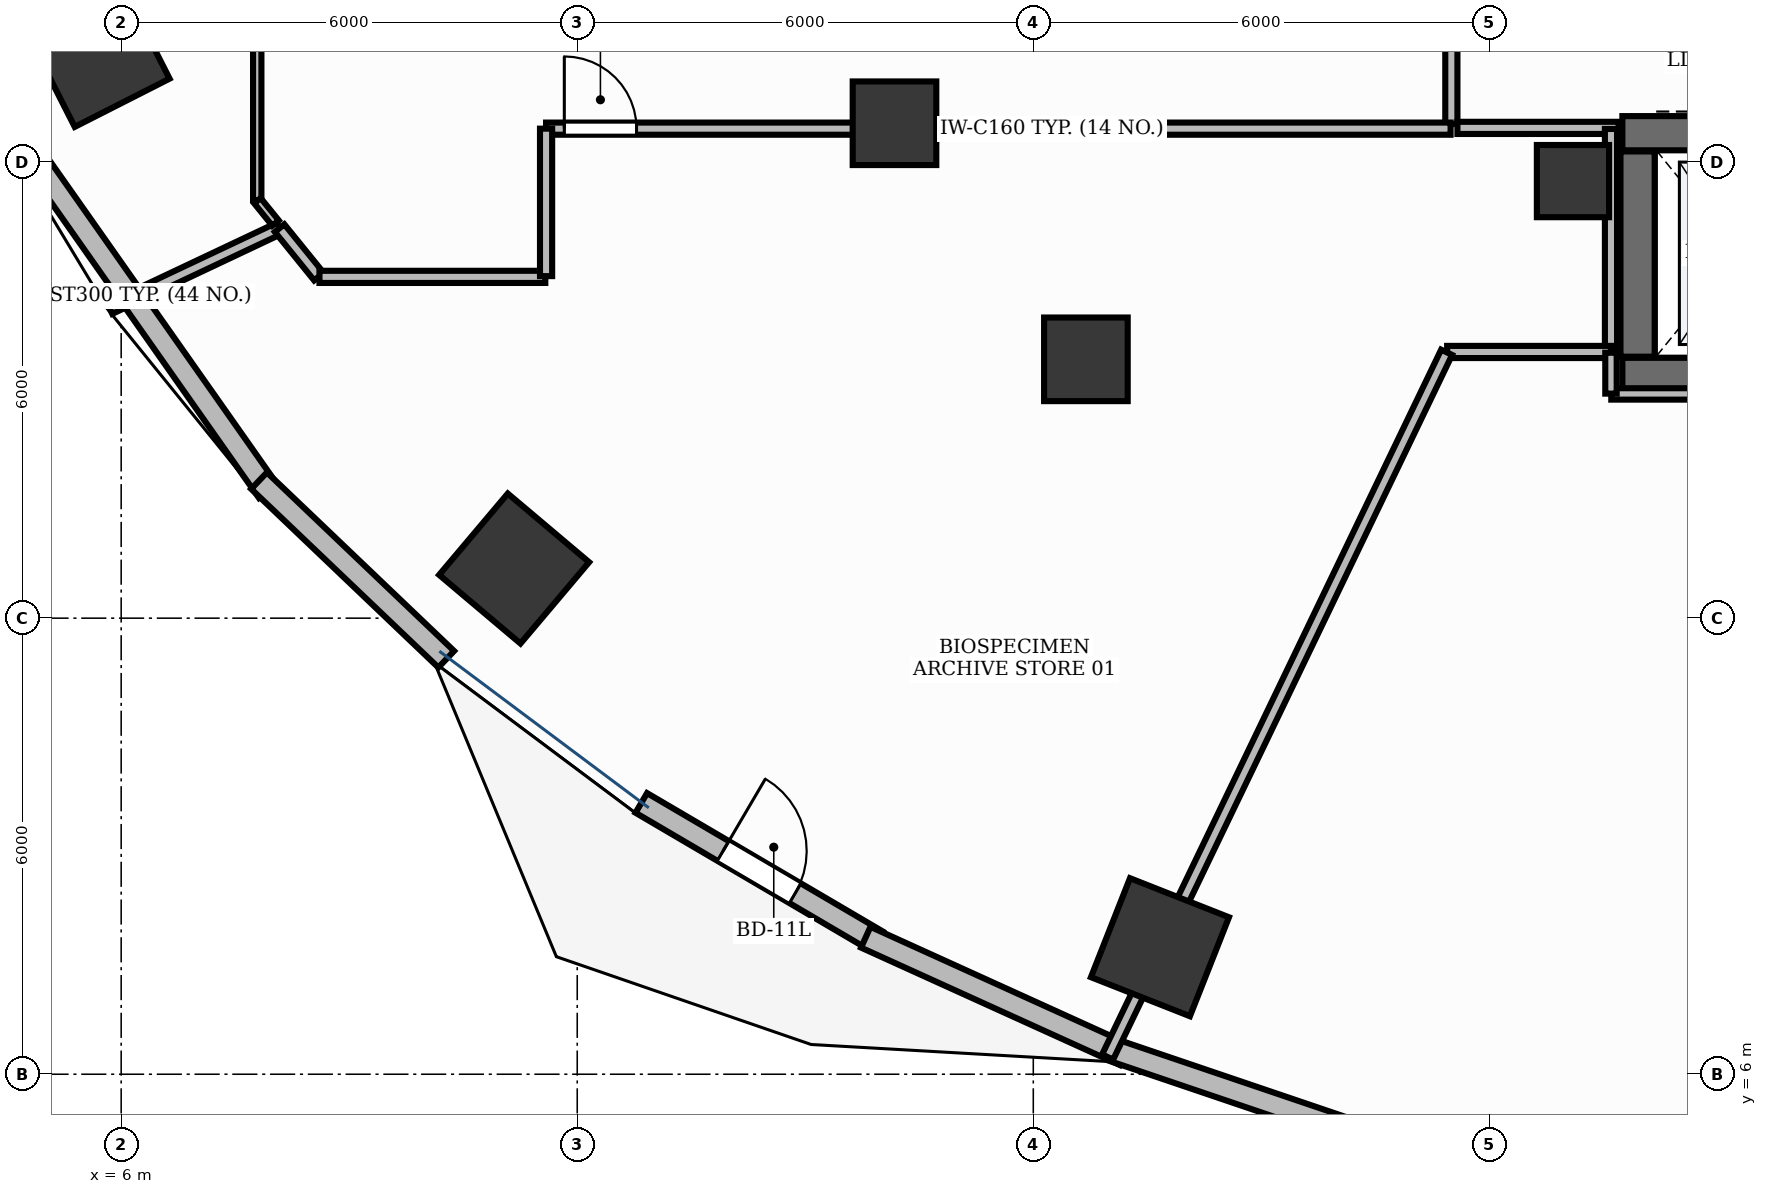
"""IFC4 building model, lengths in metres.
Left out: names, types, materials, properties, quantities, classifications, styles, units other than length and angle.
Written with IfcOpenShell. Run it as: python <this file> out.ifc"""

import sys

from ifc_helpers import new_model, si_unit, direction, frame, frame_2d, origin, origin_2d, place, context, subcontext, project, spatial, rectangle, extrude, element, fill, save


model = new_model("IFC4")
c1 = context("Model", 3, precision=1e-05, world=origin(), true_north=direction((0.0, 1.0)))
c2 = subcontext(c1, "Body", "Model", "MODEL_VIEW")
j1 = project(units=[si_unit("LENGTHUNIT", "METRE"), si_unit("PLANEANGLEUNIT", "RADIAN")], contexts=[c1])
p1 = place(None, origin())
s1 = spatial("IfcSite", under=j1, at=p1, CompositionType="ELEMENT")
p2 = place(p1, origin())
s2 = spatial("IfcBuilding", under=s1, at=p2, CompositionType="ELEMENT")
p3 = place(p2, frame((0.0, 0.0, 67.8)))
s3 = spatial("IfcBuildingStorey", under=s2, at=p3, CompositionType="ELEMENT", Elevation=67.8)
p4 = place(p3, frame((25.75, 15.2, 0.0), z_axis=(0.0, 0.0, 1.0), x_axis=(1.0, 0.0, 0.0)))
e1 = element("IfcWall", 1, at=p4, inside=s3, PredefinedType="SHEAR", context=c2, shape_type="SweptSolid", body=[
    extrude(rectangle(XDim=3.1, YDim=0.45, at=frame_2d((1.55, 0.0))), origin(), (0.0, 0.0, 1.0), 3.9),
])
p5 = place(p3, frame((25.75, 18.38, 0.0), z_axis=(0.0, 0.0, 1.0), x_axis=(1.0, 0.0, 0.0)))
e2 = element("IfcWall", 2, at=p5, inside=s3, PredefinedType="SHEAR", context=c2, shape_type="SweptSolid", body=[
    extrude(rectangle(XDim=3.1, YDim=0.45, at=frame_2d((1.55, 0.0))), origin(), (0.0, 0.0, 1.0), 3.9),
])
p6 = place(p5, frame((0.9, 0.0, 0.0)))
e3 = element("IfcOpeningElement", 3, at=p6, cuts=e2, PredefinedType="OPENING", context=c2, shape_type="SweptSolid", body=[
    extrude(rectangle(XDim=1.3, YDim=2.2, at=frame_2d((0.65, 1.1))), frame((0.0, 0.24, 0.0), z_axis=(0.0, -1.0, 0.0), x_axis=(1.0, 0.0, 0.0)), (0.0, 0.0, 1.0), 0.48),
])
p7 = place(p3, frame((25.95, 15.44, 0.0), z_axis=(0.0, 0.0, 1.0), x_axis=(0.0, 1.0, 0.0)))
e4 = element("IfcWall", 4, at=p7, inside=s3, PredefinedType="SHEAR", context=c2, shape_type="SweptSolid", body=[
    extrude(rectangle(XDim=2.7, YDim=0.45, at=frame_2d((1.35, 0.0))), origin(), (0.0, 0.0, 1.0), 3.9),
])
p8 = place(p3, frame((25.1, 17.75, -0.0), z_axis=(0.0, 0.0, 1.0), x_axis=(1.0, 0.0, 0.0)))
e5 = element("IfcColumn", 5, at=p8, inside=s3, PredefinedType="PILASTER", context=c2, shape_type="SweptSolid", body=[
    extrude(rectangle(XDim=0.95, YDim=0.95, at=origin_2d()), origin(), (0.0, 0.0, 1.0), 3.901),
])
p9 = place(p3, frame((5.696, 19.404, -0.0), z_axis=(0.0, 0.0, 1.0), x_axis=(-0.453057191132, 0.891481453292, 0.0)))
e6 = element("IfcColumn", 6, at=p9, inside=s3, PredefinedType="COLUMN", context=c2, shape_type="SweptSolid", body=[
    extrude(rectangle(XDim=1.4, YDim=1.4, at=origin_2d()), origin(), (0.0, 0.0, 1.0), 3.901),
])
p10 = place(p3, frame((16.174, 18.511, -0.0), z_axis=(0.0, 0.0, 1.0), x_axis=(1.0, 0.0, 0.0)))
e7 = element("IfcColumn", 7, at=p10, inside=s3, PredefinedType="COLUMN", context=c2, shape_type="SweptSolid", body=[
    extrude(rectangle(XDim=1.1, YDim=1.1, at=origin_2d()), origin(), (0.0, 0.0, 1.0), 3.901),
])
p11 = place(p3, frame((11.17, 12.653, -0.0), z_axis=(0.0, 0.0, 1.0), x_axis=(-0.764246456939, 0.644924300253, 0.0)))
e8 = element("IfcColumn", 8, at=p11, inside=s3, PredefinedType="COLUMN", context=c2, shape_type="SweptSolid", body=[
    extrude(rectangle(XDim=1.4, YDim=1.4, at=origin_2d()), origin(), (0.0, 0.0, 1.0), 3.901),
])
p12 = place(p3, frame((18.692, 15.405, -0.0), z_axis=(0.0, 0.0, 1.0), x_axis=(1.0, 0.0, 0.0)))
e9 = element("IfcColumn", 9, at=p12, inside=s3, PredefinedType="COLUMN", context=c2, shape_type="SweptSolid", body=[
    extrude(rectangle(XDim=1.1, YDim=1.1, at=origin_2d()), origin(), (0.0, 0.0, 1.0), 3.901),
])
p13 = place(p3, frame((19.667, 7.671, -0.0), z_axis=(0.0, 0.0, 1.0), x_axis=(-0.930225540858, 0.366988341962, 0.0)))
e10 = element("IfcColumn", 10, at=p13, inside=s3, PredefinedType="COLUMN", context=c2, shape_type="SweptSolid", body=[
    extrude(rectangle(XDim=1.4, YDim=1.4, at=origin_2d()), origin(), (0.0, 0.0, 1.0), 3.901),
])
p14 = place(p3, frame((12.843, 9.569, 0.0), z_axis=(0.0, 0.0, 1.0), x_axis=(0.862473134325, -0.506102847817, 0.0)))
e11 = element("IfcWall", 11, at=p14, inside=s3, PredefinedType="STANDARD", context=c2, shape_type="SweptSolid", body=[
    extrude(rectangle(XDim=3.595, YDim=0.3, at=frame_2d((1.798, 0.0))), origin(), (0.0, 0.0, 1.0), 3.9),
])
p15 = place(p14, frame((1.248, 0.0, 0.0)))
e12 = element("IfcOpeningElement", 12, at=p15, cuts=e11, PredefinedType="OPENING", context=c2, shape_type="SweptSolid", body=[
    extrude(rectangle(XDim=1.1, YDim=2.15, at=frame_2d((0.55, 1.075))), frame((0.0, 0.165, 0.0), z_axis=(0.0, -1.0, 0.0), x_axis=(1.0, 0.0, 0.0)), (0.0, 0.0, 1.0), 0.33),
])
p16 = place(p3, frame((4.315, 18.817, 0.0), z_axis=(0.0, 0.0, 1.0), x_axis=(0.575165804445, -0.818036855769, 0.0)))
e13 = element("IfcWall", 13, at=p16, inside=s3, PredefinedType="STANDARD", context=c2, shape_type="SweptSolid", body=[
    extrude(rectangle(XDim=6.296, YDim=0.3, at=frame_2d((3.148, 0.0))), origin(), (0.0, 0.0, 1.0), 3.9),
])
p17 = place(p3, frame((7.814, 13.808, 0.0), z_axis=(0.0, 0.0, 1.0), x_axis=(0.72369587847, -0.69011902994, 0.0)))
e14 = element("IfcWall", 14, at=p17, inside=s3, PredefinedType="STANDARD", context=c2, shape_type="SweptSolid", body=[
    extrude(rectangle(XDim=3.403, YDim=0.3, at=frame_2d((1.701, 0.0))), origin(), (0.0, 0.0, 1.0), 3.9),
])
p18 = place(p3, frame((15.796, 7.802, 0.0), z_axis=(0.0, 0.0, 1.0), x_axis=(0.910623406862, -0.413237233166, 0.0)))
e15 = element("IfcWall", 15, at=p18, inside=s3, PredefinedType="STANDARD", context=c2, shape_type="SweptSolid", body=[
    extrude(rectangle(XDim=3.74, YDim=0.3, at=frame_2d((1.87, 0.0))), origin(), (0.0, 0.0, 1.0), 3.9),
])
p19 = place(p3, frame((19.04, 6.321, 0.0), z_axis=(0.0, 0.0, 1.0), x_axis=(0.94702579403, -0.321157508773, 0.0)))
e16 = element("IfcWall", 16, at=p19, inside=s3, PredefinedType="STANDARD", context=c2, shape_type="SweptSolid", body=[
    extrude(rectangle(XDim=3.83, YDim=0.3, at=frame_2d((1.915, 0.0))), origin(), (0.0, 0.0, 1.0), 3.47),
])
p20 = place(p3, frame((23.5, 18.5, 0.0), z_axis=(0.0, 0.0, 1.0), x_axis=(0.0, 1.0, 0.0)))
e17 = element("IfcWall", 17, at=p20, inside=s3, PredefinedType="PARTITIONING", context=c2, shape_type="SweptSolid", body=[
    extrude(rectangle(XDim=3.4, YDim=0.16, at=frame_2d((1.7, 0.0))), origin(), (0.0, 0.0, 1.0), 2.91),
])
p21 = place(p20, frame((1.175, 0.0, 0.0)))
e18 = element("IfcOpeningElement", 18, at=p21, cuts=e17, PredefinedType="OPENING", context=c2, shape_type="SweptSolid", body=[
    extrude(rectangle(XDim=1.05, YDim=2.15, at=frame_2d((0.525, 1.075))), frame((0.0, 0.095, 0.0), z_axis=(0.0, -1.0, 0.0), x_axis=(1.0, 0.0, 0.0)), (0.0, 0.0, 1.0), 0.19),
])
p22 = place(p3, frame((23.58, 18.45, 0.0), z_axis=(0.0, 0.0, 1.0), x_axis=(1.0, 0.0, 0.0)))
e19 = element("IfcWall", 19, at=p22, inside=s3, PredefinedType="PARTITIONING", context=c2, shape_type="SweptSolid", body=[
    extrude(rectangle(XDim=2.12, YDim=0.16, at=frame_2d((1.06, 0.0))), origin(), (0.0, 0.0, 1.0), 2.91),
])
p23 = place(p3, frame((11.59, 18.44, 0.0), z_axis=(0.0, 0.0, 1.0), x_axis=(1.0, 0.0, 0.0)))
e20 = element("IfcWall", 20, at=p23, inside=s3, PredefinedType="PARTITIONING", context=c2, shape_type="SweptSolid", body=[
    extrude(rectangle(XDim=11.9, YDim=0.16, at=frame_2d((5.95, 0.0))), origin(), (0.0, 0.0, 1.0), 2.91),
])
p24 = place(p23, frame((0.24, 0.0, 0.0)))
e21 = element("IfcOpeningElement", 21, at=p24, cuts=e20, PredefinedType="OPENING", context=c2, shape_type="SweptSolid", body=[
    extrude(rectangle(XDim=0.95, YDim=2.15, at=frame_2d((0.475, 1.075))), frame((0.0, 0.095, 0.0), z_axis=(0.0, -1.0, 0.0), x_axis=(1.0, 0.0, 0.0)), (0.0, 0.0, 1.0), 0.19),
])
p25 = place(p3, frame((7.79, 36.501, 0.0), z_axis=(0.0, 0.0, 1.0), x_axis=(0.0, -1.0, 0.0)))
e22 = element("IfcWall", 22, at=p25, inside=s3, PredefinedType="MOVABLE", context=c2, shape_type="SweptSolid", body=[
    extrude(rectangle(XDim=19.002, YDim=0.11, at=frame_2d((9.501, 0.0))), origin(), (0.0, 0.0, 1.0), 2.91),
])
p26 = place(p25, frame((6.956, 0.0, 0.0)))
e23 = element("IfcOpeningElement", 23, at=p26, cuts=e22, PredefinedType="OPENING", context=c2, shape_type="SweptSolid", body=[
    extrude(rectangle(XDim=0.95, YDim=2.15, at=frame_2d((0.475, 1.075))), frame((0.0, 0.07, 0.0), z_axis=(0.0, -1.0, 0.0), x_axis=(1.0, 0.0, 0.0)), (0.0, 0.0, 1.0), 0.14),
])
p27 = place(p3, frame((5.848, 16.076, 0.0), z_axis=(0.0, 0.0, 1.0), x_axis=(0.904251823465, 0.426999578173, 0.0)))
e24 = element("IfcWall", 24, at=p27, inside=s3, PredefinedType="PARTITIONING", context=c2, shape_type="SweptSolid", body=[
    extrude(rectangle(XDim=2.473, YDim=0.16, at=frame_2d((1.236, 0.0))), origin(), (0.0, 0.0, 1.0), 2.91),
])
p28 = place(p3, frame((8.084, 17.132, 0.0), z_axis=(0.0, 0.0, 1.0), x_axis=(0.629146883335, -0.77728643317, 0.0)))
e25 = element("IfcWall", 25, at=p28, inside=s3, PredefinedType="PARTITIONING", context=c2, shape_type="SweptSolid", body=[
    extrude(rectangle(XDim=0.821, YDim=0.16, at=frame_2d((0.41, 0.0))), origin(), (0.0, 0.0, 1.0), 2.91),
])
p29 = place(p3, frame((8.609, 16.49, 0.0), z_axis=(0.0, 0.0, 1.0), x_axis=(1.0, 0.0, 0.0)))
e26 = element("IfcWall", 26, at=p29, inside=s3, PredefinedType="PARTITIONING", context=c2, shape_type="SweptSolid", body=[
    extrude(rectangle(XDim=2.971, YDim=0.16, at=frame_2d((1.486, 0.0))), origin(), (0.0, 0.0, 1.0), 2.91),
])
p30 = place(p3, frame((11.59, 16.5, 0.0), z_axis=(0.0, 0.0, 1.0), x_axis=(0.0, 1.0, 0.0)))
e27 = element("IfcWall", 27, at=p30, inside=s3, PredefinedType="PARTITIONING", context=c2, shape_type="SweptSolid", body=[
    extrude(rectangle(XDim=1.94, YDim=0.16, at=frame_2d((0.97, 0.0))), origin(), (0.0, 0.0, 1.0), 2.91),
])
p31 = place(p3, frame((25.6, 18.436, 0.0), z_axis=(0.0, 0.0, 1.0), x_axis=(0.0, -1.0, 0.0)))
e28 = element("IfcWall", 28, at=p31, inside=s3, PredefinedType="PARTITIONING", context=c2, shape_type="SweptSolid", body=[
    extrude(rectangle(XDim=2.934, YDim=0.16, at=frame_2d((1.467, 0.0))), origin(), (0.0, 0.0, 1.0), 2.91),
])
p32 = place(p3, frame((25.6, 15.502, 0.0), z_axis=(0.0, 0.0, 1.0), x_axis=(-1.0, 0.0, 0.0)))
e29 = element("IfcWall", 29, at=p32, inside=s3, PredefinedType="PARTITIONING", context=c2, shape_type="SweptSolid", body=[
    extrude(rectangle(XDim=2.155, YDim=0.16, at=frame_2d((1.078, 0.0))), origin(), (0.0, 0.0, 1.0), 2.91),
])
p33 = place(p3, frame((23.438, 15.498, 0.0), z_axis=(0.0, 0.0, 1.0), x_axis=(-0.433521640822, -0.90114315563, 0.0)))
e30 = element("IfcWall", 30, at=p33, inside=s3, PredefinedType="PARTITIONING", context=c2, shape_type="SweptSolid", body=[
    extrude(rectangle(XDim=10.288, YDim=0.16, at=frame_2d((5.144, 0.0))), origin(), (0.0, 0.0, 1.0), 2.91),
])
p34 = place(p3, frame((25.604, 14.95, 0.0), z_axis=(0.0, 0.0, 1.0), x_axis=(1.0, 0.0, 0.0)))
e31 = element("IfcWall", 31, at=p34, inside=s3, PredefinedType="PARTITIONING", context=c2, shape_type="SweptSolid", body=[
    extrude(rectangle(XDim=3.392, YDim=0.15, at=frame_2d((1.696, 0.0))), origin(), (0.0, 0.0, 1.0), 2.91),
])
p35 = place(p3, frame((25.6, 15.492, 0.0), z_axis=(0.0, 0.0, 1.0), x_axis=(0.0, -1.0, 0.0)))
e32 = element("IfcWall", 32, at=p35, inside=s3, PredefinedType="PARTITIONING", context=c2, shape_type="SweptSolid", body=[
    extrude(rectangle(XDim=0.538, YDim=0.15, at=frame_2d((0.269, 0.0))), origin(), (0.0, 0.0, 1.0), 2.91),
])
p36 = place(p3, frame((7.792, 17.492, 0.0), z_axis=(0.0, 0.0, 1.0), x_axis=(0.629086970035, -0.77733492404, 0.0)))
e33 = element("IfcWall", 33, at=p36, inside=s3, PredefinedType="MOVABLE", context=c2, shape_type="SweptSolid", body=[
    extrude(rectangle(XDim=0.379, YDim=0.11, at=frame_2d((0.189, 0.0))), origin(), (0.0, 0.0, 1.0), 2.91),
])
p37 = place(p15, origin())
e34 = element("IfcDoor", 34, at=p37, inside=s3, OperationType="SINGLE_SWING_LEFT", PredefinedType="DOOR", context=c2, shape_type="SweptSolid", body=[
    extrude(rectangle(XDim=1.1, YDim=2.15, at=frame_2d((0.55, 1.075))), frame((0.0, 0.025, 0.0), z_axis=(0.0, -1.0, 0.0), x_axis=(1.0, 0.0, 0.0)), (0.0, 0.0, 1.0), 0.05),
])
fill(e12, e34)
p38 = place(p24, origin())
e35 = element("IfcDoor", 35, at=p38, inside=s3, OperationType="SINGLE_SWING_LEFT", PredefinedType="DOOR", context=c2, shape_type="SweptSolid", body=[
    extrude(rectangle(XDim=0.95, YDim=2.15, at=frame_2d((0.475, 1.075))), frame((0.0, 0.025, 0.0), z_axis=(0.0, -1.0, 0.0), x_axis=(1.0, 0.0, 0.0)), (0.0, 0.0, 1.0), 0.05),
])
fill(e21, e35)
save(model, sys.argv[1])
